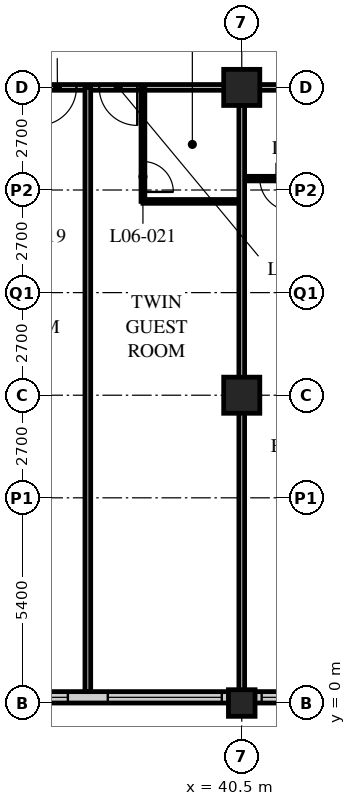
"""IFC4 building model, lengths in metres.
Left out: names, types, materials, properties, quantities, classifications, styles, units other than length and angle.
Written with IfcOpenShell. Run it as: python <this file> out.ifc"""

import sys

from ifc_helpers import new_model, si_unit, direction, frame, frame_2d, origin, origin_2d, place, context, subcontext, project, spatial, rectangle, hollow_rectangle, extrude, element, fill, save


model = new_model("IFC4")
c1 = context("Model", 3, precision=1e-05, world=origin(), true_north=direction((0.0, 1.0)))
c2 = subcontext(c1, "Body", "Model", "MODEL_VIEW")
j1 = project(units=[si_unit("LENGTHUNIT", "METRE"), si_unit("PLANEANGLEUNIT", "RADIAN")], contexts=[c1])
p1 = place(None, origin())
s1 = spatial("IfcSite", under=j1, at=p1, CompositionType="ELEMENT")
p2 = place(p1, origin())
s2 = spatial("IfcBuilding", under=s1, at=p2, CompositionType="ELEMENT")
p3 = place(p2, frame((0.0, 0.0, 33.0)))
s3 = spatial("IfcBuildingStorey", under=s2, at=p3, CompositionType="ELEMENT", Elevation=33.0)
p4 = place(p3, frame((40.5, 0.0, 0.0), z_axis=(0.0, 0.0, 1.0), x_axis=(1.0, 0.0, 0.0)))
e1 = element("IfcColumn", 1, at=p4, inside=s3, PredefinedType="COLUMN", context=c2, shape_type="SweptSolid", body=[
    extrude(hollow_rectangle(XDim=0.7, YDim=0.7, WallThickness=0.06, at=origin_2d()), origin(), (0.0, 0.0, 1.0), 3.4),
])
for number, where, z_axis, x_axis in (
    (2, (40.5, 8.1, 0.0), (0.0, 0.0, 1.0), (1.0, 0.0, 0.0)),
    (3, (40.5, 16.2, 0.0), (0.0, 0.0, 1.0), (1.0, 0.0, 0.0)),
):
    element("IfcColumn", number, at=place(p3, frame(where, z_axis=z_axis, x_axis=x_axis)), inside=s3, PredefinedType="COLUMN", context=c2, shape_type="SweptSolid", body=[
        extrude(hollow_rectangle(XDim=0.95, YDim=0.95, WallThickness=0.095, at=origin_2d()), origin(), (0.0, 0.0, 1.0), 3.4),
    ])
p5 = place(p3, frame((8.4, 0.15, 0.0), z_axis=(0.0, 0.0, 1.0), x_axis=(1.0, 0.0, 0.0)))
e4 = element("IfcWall", 4, at=p5, inside=s3, PredefinedType="SOLIDWALL", context=c2, shape_type="SweptSolid", body=[
    extrude(rectangle(XDim=40.2, YDim=0.3, at=frame_2d((20.1, 0.0))), origin(), (0.0, 0.0, 1.0), 3.19),
])
p6 = place(p5, frame((0.225, 0.0, 0.9)))
e5 = element("IfcOpeningElement", 5, at=p6, cuts=e4, PredefinedType="OPENING", context=c2, shape_type="SweptSolid", body=[
    extrude(rectangle(XDim=3.0, YDim=2.0, at=frame_2d((1.5, 1.0))), frame((0.0, 0.16, 0.0), z_axis=(0.0, -1.0, 0.0), x_axis=(1.0, 0.0, 0.0)), (0.0, 0.0, 1.0), 0.32),
])
p7 = place(p5, frame((4.275, 0.0, 0.9)))
e6 = element("IfcOpeningElement", 6, at=p7, cuts=e4, PredefinedType="OPENING", context=c2, shape_type="SweptSolid", body=[
    extrude(rectangle(XDim=3.0, YDim=2.0, at=frame_2d((1.5, 1.0))), frame((0.0, 0.16, 0.0), z_axis=(0.0, -1.0, 0.0), x_axis=(1.0, 0.0, 0.0)), (0.0, 0.0, 1.0), 0.32),
])
p8 = place(p5, frame((8.325, 0.0, 0.9)))
e7 = element("IfcOpeningElement", 7, at=p8, cuts=e4, PredefinedType="OPENING", context=c2, shape_type="SweptSolid", body=[
    extrude(rectangle(XDim=3.0, YDim=2.0, at=frame_2d((1.5, 1.0))), frame((0.0, 0.16, 0.0), z_axis=(0.0, -1.0, 0.0), x_axis=(1.0, 0.0, 0.0)), (0.0, 0.0, 1.0), 0.32),
])
p9 = place(p5, frame((12.375, 0.0, 0.9)))
e8 = element("IfcOpeningElement", 8, at=p9, cuts=e4, PredefinedType="OPENING", context=c2, shape_type="SweptSolid", body=[
    extrude(rectangle(XDim=3.0, YDim=2.0, at=frame_2d((1.5, 1.0))), frame((0.0, 0.16, 0.0), z_axis=(0.0, -1.0, 0.0), x_axis=(1.0, 0.0, 0.0)), (0.0, 0.0, 1.0), 0.32),
])
p10 = place(p5, frame((16.425, 0.0, 0.9)))
e9 = element("IfcOpeningElement", 9, at=p10, cuts=e4, PredefinedType="OPENING", context=c2, shape_type="SweptSolid", body=[
    extrude(rectangle(XDim=3.0, YDim=2.0, at=frame_2d((1.5, 1.0))), frame((0.0, 0.16, 0.0), z_axis=(0.0, -1.0, 0.0), x_axis=(1.0, 0.0, 0.0)), (0.0, 0.0, 1.0), 0.32),
])
p11 = place(p5, frame((20.475, 0.0, 0.9)))
e10 = element("IfcOpeningElement", 10, at=p11, cuts=e4, PredefinedType="OPENING", context=c2, shape_type="SweptSolid", body=[
    extrude(rectangle(XDim=3.0, YDim=2.0, at=frame_2d((1.5, 1.0))), frame((0.0, 0.16, 0.0), z_axis=(0.0, -1.0, 0.0), x_axis=(1.0, 0.0, 0.0)), (0.0, 0.0, 1.0), 0.32),
])
p12 = place(p5, frame((24.525, 0.0, 0.9)))
e11 = element("IfcOpeningElement", 11, at=p12, cuts=e4, PredefinedType="OPENING", context=c2, shape_type="SweptSolid", body=[
    extrude(rectangle(XDim=3.0, YDim=2.0, at=frame_2d((1.5, 1.0))), frame((0.0, 0.16, 0.0), z_axis=(0.0, -1.0, 0.0), x_axis=(1.0, 0.0, 0.0)), (0.0, 0.0, 1.0), 0.32),
])
p13 = place(p5, frame((28.575, 0.0, 0.9)))
e12 = element("IfcOpeningElement", 12, at=p13, cuts=e4, PredefinedType="OPENING", context=c2, shape_type="SweptSolid", body=[
    extrude(rectangle(XDim=3.0, YDim=2.0, at=frame_2d((1.5, 1.0))), frame((0.0, 0.16, 0.0), z_axis=(0.0, -1.0, 0.0), x_axis=(1.0, 0.0, 0.0)), (0.0, 0.0, 1.0), 0.32),
])
p14 = place(p5, frame((32.625, 0.0, 0.9)))
e13 = element("IfcOpeningElement", 13, at=p14, cuts=e4, PredefinedType="OPENING", context=c2, shape_type="SweptSolid", body=[
    extrude(rectangle(XDim=3.0, YDim=2.0, at=frame_2d((1.5, 1.0))), frame((0.0, 0.16, 0.0), z_axis=(0.0, -1.0, 0.0), x_axis=(1.0, 0.0, 0.0)), (0.0, 0.0, 1.0), 0.32),
])
p15 = place(p5, frame((36.675, 0.0, 0.9)))
e14 = element("IfcOpeningElement", 14, at=p15, cuts=e4, PredefinedType="OPENING", context=c2, shape_type="SweptSolid", body=[
    extrude(rectangle(XDim=3.0, YDim=2.0, at=frame_2d((1.5, 1.0))), frame((0.0, 0.16, 0.0), z_axis=(0.0, -1.0, 0.0), x_axis=(1.0, 0.0, 0.0)), (0.0, 0.0, 1.0), 0.32),
])
p16 = place(p3, frame((12.15, 16.2, 0.0), z_axis=(0.0, 0.0, 1.0), x_axis=(1.0, 0.0, 0.0)))
e15 = element("IfcWall", 15, at=p16, inside=s3, PredefinedType="PARTITIONING", context=c2, shape_type="SweptSolid", body=[
    extrude(rectangle(XDim=32.4, YDim=0.15, at=frame_2d((16.2, 0.0))), origin(), (0.0, 0.0, 1.0), 2.578),
])
p17 = place(p16, frame((6.5, 0.0, 0.0)))
e16 = element("IfcOpeningElement", 16, at=p17, cuts=e15, PredefinedType="OPENING", context=c2, shape_type="SweptSolid", body=[
    extrude(rectangle(XDim=1.0, YDim=2.1, at=frame_2d((0.5, 1.05))), frame((0.0, 0.085, 0.0), z_axis=(0.0, -1.0, 0.0), x_axis=(1.0, 0.0, 0.0)), (0.0, 0.0, 1.0), 0.17),
])
p18 = place(p16, frame((8.4, 0.0, 0.0)))
e17 = element("IfcOpeningElement", 17, at=p18, cuts=e15, PredefinedType="OPENING", context=c2, shape_type="SweptSolid", body=[
    extrude(rectangle(XDim=1.0, YDim=2.1, at=frame_2d((0.5, 1.05))), frame((0.0, 0.085, 0.0), z_axis=(0.0, -1.0, 0.0), x_axis=(1.0, 0.0, 0.0)), (0.0, 0.0, 1.0), 0.17),
])
p19 = place(p16, frame((14.6, 0.0, 0.0)))
e18 = element("IfcOpeningElement", 18, at=p19, cuts=e15, PredefinedType="OPENING", context=c2, shape_type="SweptSolid", body=[
    extrude(rectangle(XDim=1.0, YDim=2.1, at=frame_2d((0.5, 1.05))), frame((0.0, 0.085, 0.0), z_axis=(0.0, -1.0, 0.0), x_axis=(1.0, 0.0, 0.0)), (0.0, 0.0, 1.0), 0.17),
])
p20 = place(p16, frame((16.5, 0.0, 0.0)))
e19 = element("IfcOpeningElement", 19, at=p20, cuts=e15, PredefinedType="OPENING", context=c2, shape_type="SweptSolid", body=[
    extrude(rectangle(XDim=1.0, YDim=2.1, at=frame_2d((0.5, 1.05))), frame((0.0, 0.085, 0.0), z_axis=(0.0, -1.0, 0.0), x_axis=(1.0, 0.0, 0.0)), (0.0, 0.0, 1.0), 0.17),
])
p21 = place(p16, frame((23.0, 0.0, 0.0)))
e20 = element("IfcOpeningElement", 20, at=p21, cuts=e15, PredefinedType="OPENING", context=c2, shape_type="SweptSolid", body=[
    extrude(rectangle(XDim=1.0, YDim=2.1, at=frame_2d((0.5, 1.05))), frame((0.0, 0.085, 0.0), z_axis=(0.0, -1.0, 0.0), x_axis=(1.0, 0.0, 0.0)), (0.0, 0.0, 1.0), 0.17),
])
p22 = place(p16, frame((24.6, 0.0, 0.0)))
e21 = element("IfcOpeningElement", 21, at=p22, cuts=e15, PredefinedType="OPENING", context=c2, shape_type="SweptSolid", body=[
    extrude(rectangle(XDim=1.0, YDim=2.1, at=frame_2d((0.5, 1.05))), frame((0.0, 0.085, 0.0), z_axis=(0.0, -1.0, 0.0), x_axis=(1.0, 0.0, 0.0)), (0.0, 0.0, 1.0), 0.17),
])
p23 = place(p16, frame((1.525, 0.0, 0.0)))
e22 = element("IfcOpeningElement", 22, at=p23, cuts=e15, PredefinedType="OPENING", context=c2, shape_type="SweptSolid", body=[
    extrude(rectangle(XDim=1.0, YDim=2.1, at=frame_2d((0.5, 1.05))), frame((0.0, 0.085, 0.0), z_axis=(0.0, -1.0, 0.0), x_axis=(1.0, 0.0, 0.0)), (0.0, 0.0, 1.0), 0.17),
])
p24 = place(p16, frame((29.875, 0.0, 0.0)))
e23 = element("IfcOpeningElement", 23, at=p24, cuts=e15, PredefinedType="OPENING", context=c2, shape_type="SweptSolid", body=[
    extrude(rectangle(XDim=1.0, YDim=2.1, at=frame_2d((0.5, 1.05))), frame((0.0, 0.085, 0.0), z_axis=(0.0, -1.0, 0.0), x_axis=(1.0, 0.0, 0.0)), (0.0, 0.0, 1.0), 0.17),
])
p25 = place(p3, frame((36.45, 16.2, 0.0), z_axis=(0.0, 0.0, 1.0), x_axis=(0.0, -1.0, 0.0)))
e24 = element("IfcWall", 24, at=p25, inside=s3, PredefinedType="PARTITIONING", context=c2, shape_type="SweptSolid", body=[
    extrude(rectangle(XDim=15.9, YDim=0.15, at=frame_2d((7.95, 0.0))), origin(), (0.0, 0.0, 1.0), 3.19),
])
p26 = place(p3, frame((37.9, 13.2, 0.0), z_axis=(0.0, 0.0, 1.0), x_axis=(1.0, 0.0, 0.0)))
e25 = element("IfcWall", 25, at=p26, inside=s3, PredefinedType="PARTITIONING", context=c2, shape_type="SweptSolid", body=[
    extrude(rectangle(XDim=2.6, YDim=0.1, at=frame_2d((1.3, 0.0))), origin(), (0.0, 0.0, 1.0), 3.19),
])
p27 = place(p3, frame((37.9, 16.2, 0.0), z_axis=(0.0, 0.0, 1.0), x_axis=(0.0, -1.0, 0.0)))
e26 = element("IfcWall", 26, at=p27, inside=s3, PredefinedType="PARTITIONING", context=c2, shape_type="SweptSolid", body=[
    extrude(rectangle(XDim=3.0, YDim=0.1, at=frame_2d((1.5, 0.0))), origin(), (0.0, 0.0, 1.0), 3.19),
])
p28 = place(p27, frame((1.95, 0.0, 0.0)))
e27 = element("IfcOpeningElement", 27, at=p28, cuts=e26, PredefinedType="OPENING", context=c2, shape_type="SweptSolid", body=[
    extrude(rectangle(XDim=0.8, YDim=2.1, at=frame_2d((0.4, 1.05))), frame((0.0, 0.06, 0.0), z_axis=(0.0, -1.0, 0.0), x_axis=(1.0, 0.0, 0.0)), (0.0, 0.0, 1.0), 0.12),
])
p29 = place(p3, frame((40.5, 13.8, 0.0), z_axis=(0.0, 0.0, 1.0), x_axis=(1.0, 0.0, 0.0)))
e28 = element("IfcWall", 28, at=p29, inside=s3, PredefinedType="PARTITIONING", context=c2, shape_type="SweptSolid", body=[
    extrude(rectangle(XDim=8.05, YDim=0.12, at=frame_2d((4.025, 0.0))), origin(), (0.0, 0.0, 1.0), 3.19),
])
p30 = place(p29, frame((0.475, 0.0, 0.0)))
e29 = element("IfcOpeningElement", 29, at=p30, cuts=e28, PredefinedType="OPENING", context=c2, shape_type="SweptSolid", body=[
    extrude(rectangle(XDim=0.85, YDim=2.1, at=frame_2d((0.425, 1.05))), frame((0.0, 0.07, 0.0), z_axis=(0.0, -1.0, 0.0), x_axis=(1.0, 0.0, 0.0)), (0.0, 0.0, 1.0), 0.14),
])
p31 = place(p29, frame((4.325, 0.0, 0.0)))
e30 = element("IfcOpeningElement", 30, at=p31, cuts=e28, PredefinedType="OPENING", context=c2, shape_type="SweptSolid", body=[
    extrude(rectangle(XDim=0.85, YDim=2.1, at=frame_2d((0.425, 1.05))), frame((0.0, 0.07, 0.0), z_axis=(0.0, -1.0, 0.0), x_axis=(1.0, 0.0, 0.0)), (0.0, 0.0, 1.0), 0.14),
])
p32 = place(p3, frame((40.5, 16.2, 0.0), z_axis=(0.0, 0.0, 1.0), x_axis=(0.0, -1.0, 0.0)))
e31 = element("IfcWall", 31, at=p32, inside=s3, PredefinedType="PARTITIONING", context=c2, shape_type="SweptSolid", body=[
    extrude(rectangle(XDim=15.9, YDim=0.15, at=frame_2d((7.95, 0.0))), origin(), (0.0, 0.0, 1.0), 2.578),
])
p33 = place(p12, origin())
e32 = element("IfcWindow", 32, at=p33, inside=s3, PartitioningType="SINGLE_PANEL", PredefinedType="WINDOW", context=c2, shape_type="SweptSolid", body=[
    extrude(rectangle(XDim=3.0, YDim=2.0, at=frame_2d((1.5, 1.0))), frame((0.0, 0.03, 0.0), z_axis=(0.0, -1.0, 0.0), x_axis=(1.0, 0.0, 0.0)), (0.0, 0.0, 1.0), 0.06),
])
fill(e11, e32)
p34 = place(p13, origin())
e33 = element("IfcWindow", 33, at=p34, inside=s3, PartitioningType="SINGLE_PANEL", PredefinedType="WINDOW", context=c2, shape_type="SweptSolid", body=[
    extrude(rectangle(XDim=3.0, YDim=2.0, at=frame_2d((1.5, 1.0))), frame((0.0, 0.03, 0.0), z_axis=(0.0, -1.0, 0.0), x_axis=(1.0, 0.0, 0.0)), (0.0, 0.0, 1.0), 0.06),
])
fill(e12, e33)
p35 = place(p14, origin())
e34 = element("IfcWindow", 34, at=p35, inside=s3, PartitioningType="SINGLE_PANEL", PredefinedType="WINDOW", context=c2, shape_type="SweptSolid", body=[
    extrude(rectangle(XDim=3.0, YDim=2.0, at=frame_2d((1.5, 1.0))), frame((0.0, 0.03, 0.0), z_axis=(0.0, -1.0, 0.0), x_axis=(1.0, 0.0, 0.0)), (0.0, 0.0, 1.0), 0.06),
])
fill(e13, e34)
p36 = place(p21, origin())
e35 = element("IfcDoor", 35, at=p36, inside=s3, OperationType="SINGLE_SWING_RIGHT", PredefinedType="DOOR", context=c2, shape_type="SweptSolid", body=[
    extrude(rectangle(XDim=1.0, YDim=2.1, at=frame_2d((0.5, 1.05))), frame((0.0, 0.025, 0.0), z_axis=(0.0, -1.0, 0.0), x_axis=(1.0, 0.0, 0.0)), (0.0, 0.0, 1.0), 0.05),
])
fill(e20, e35)
p37 = place(p28, origin())
e36 = element("IfcDoor", 36, at=p37, inside=s3, OperationType="SINGLE_SWING_RIGHT", PredefinedType="DOOR", context=c2, shape_type="SweptSolid", body=[
    extrude(rectangle(XDim=0.8, YDim=2.1, at=frame_2d((0.4, 1.05))), frame((0.0, 0.025, 0.0), z_axis=(0.0, -1.0, 0.0), x_axis=(1.0, 0.0, 0.0)), (0.0, 0.0, 1.0), 0.05),
])
fill(e27, e36)
p38 = place(p22, origin())
e37 = element("IfcDoor", 37, at=p38, inside=s3, OperationType="SINGLE_SWING_LEFT", PredefinedType="DOOR", context=c2, shape_type="SweptSolid", body=[
    extrude(rectangle(XDim=1.0, YDim=2.1, at=frame_2d((0.5, 1.05))), frame((0.0, 0.025, 0.0), z_axis=(0.0, -1.0, 0.0), x_axis=(1.0, 0.0, 0.0)), (0.0, 0.0, 1.0), 0.05),
])
fill(e21, e37)
p39 = place(p30, origin())
e38 = element("IfcDoor", 38, at=p39, inside=s3, OperationType="SINGLE_SWING_LEFT", PredefinedType="DOOR", context=c2, shape_type="SweptSolid", body=[
    extrude(rectangle(XDim=0.85, YDim=2.1, at=frame_2d((0.425, 1.05))), frame((0.0, 0.025, 0.0), z_axis=(0.0, -1.0, 0.0), x_axis=(1.0, 0.0, 0.0)), (0.0, 0.0, 1.0), 0.05),
])
fill(e29, e38)
save(model, sys.argv[1])
